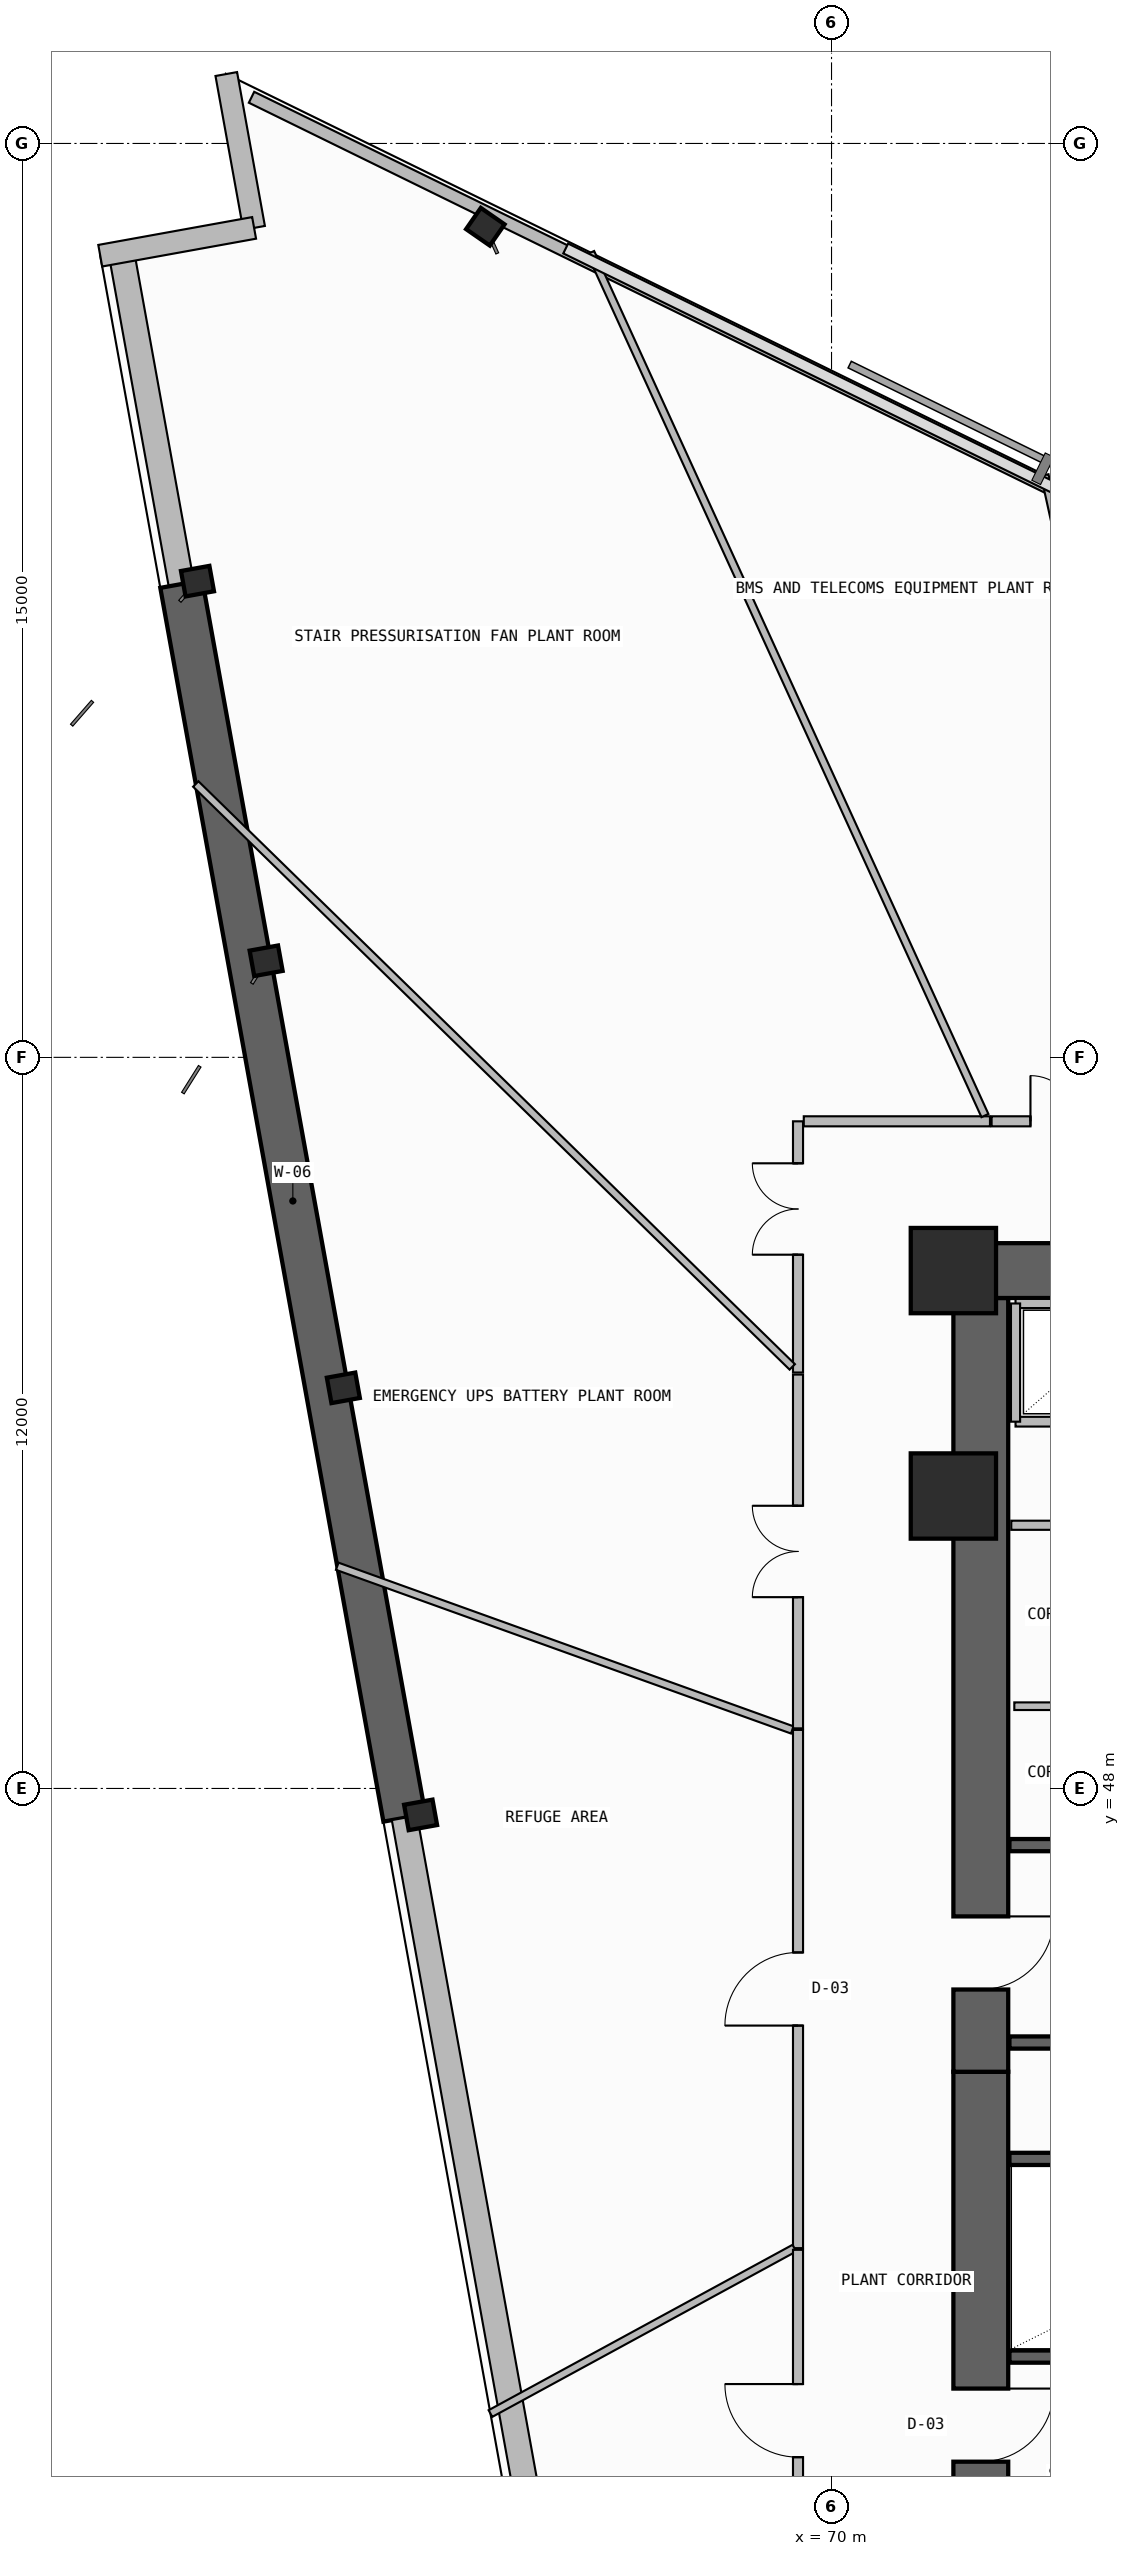
"""IFC4 building model, lengths in metres.
Left out: names, types, materials, properties, quantities, classifications, styles, units other than length and angle.
Written with IfcOpenShell. Run it as: python <this file> out.ifc"""

import sys

from ifc_helpers import new_model, si_unit, direction, frame, frame_2d, origin, origin_2d, place, context, subcontext, project, spatial, rectangle, i_section, extrude, element, fill, save


model = new_model("IFC4")
c1 = context("Model", 3, precision=1e-05, world=origin(), true_north=direction((0.0, 1.0)))
c2 = subcontext(c1, "Body", "Model", "MODEL_VIEW")
j1 = project(units=[si_unit("LENGTHUNIT", "METRE"), si_unit("PLANEANGLEUNIT", "RADIAN")], contexts=[c1])
p1 = place(None, origin())
s1 = spatial("IfcSite", under=j1, at=p1, CompositionType="ELEMENT")
p2 = place(p1, origin())
s2 = spatial("IfcBuilding", under=s1, at=p2, CompositionType="ELEMENT")
p3 = place(p2, frame((0.0, 0.0, 128.1)))
s3 = spatial("IfcBuildingStorey", under=s2, at=p3, CompositionType="ELEMENT", Elevation=128.1)
p4 = place(p3, frame((72.45, 35.5, -0.5), z_axis=(0.0, 0.0, 1.0), x_axis=(0.0, 1.0, 0.0)))
e1 = element("IfcWall", 1, at=p4, inside=s3, PredefinedType="SHEAR", context=c2, shape_type="SweptSolid", body=[
    extrude(rectangle(XDim=7.85, YDim=0.9, at=frame_2d((3.925, 0.0))), origin(), (0.0, 0.0, 1.0), 4.3),
])
p5 = place(p4, frame((1.45, 0.0, 0.5)))
e2 = element("IfcOpeningElement", 2, at=p5, cuts=e1, PredefinedType="OPENING", context=c2, shape_type="SweptSolid", body=[
    extrude(rectangle(XDim=1.2, YDim=2.2, at=frame_2d((0.6, 1.1))), frame((0.0, 0.46, 0.0), z_axis=(0.0, -1.0, 0.0), x_axis=(1.0, 0.0, 0.0)), (0.0, 0.0, 1.0), 0.92),
])
p6 = place(p3, frame((72.45, 43.35, -0.5), z_axis=(0.0, 0.0, 1.0), x_axis=(0.0, 1.0, 0.0)))
e3 = element("IfcWall", 3, at=p6, inside=s3, PredefinedType="SHEAR", context=c2, shape_type="SweptSolid", body=[
    extrude(rectangle(XDim=12.7, YDim=0.9, at=frame_2d((6.35, 0.0))), origin(), (0.0, 0.0, 1.0), 4.3),
])
p7 = place(p6, frame((1.35, 0.0, 0.5)))
e4 = element("IfcOpeningElement", 4, at=p7, cuts=e3, PredefinedType="OPENING", context=c2, shape_type="SweptSolid", body=[
    extrude(rectangle(XDim=1.2, YDim=2.2, at=frame_2d((0.6, 1.1))), frame((0.0, 0.46, 0.0), z_axis=(0.0, -1.0, 0.0), x_axis=(1.0, 0.0, 0.0)), (0.0, 0.0, 1.0), 0.92),
])
p8 = place(p3, frame((72.0, 56.5, -0.5), z_axis=(0.0, 0.0, 1.0), x_axis=(1.0, 0.0, 0.0)))
e5 = element("IfcWall", 5, at=p8, inside=s3, PredefinedType="SHEAR", context=c2, shape_type="SweptSolid", body=[
    extrude(rectangle(XDim=13.9, YDim=0.9, at=frame_2d((6.95, 0.0))), origin(), (0.0, 0.0, 1.0), 4.3),
])
for number, where, z_axis, x_axis in (
    (6, (72.0, 52.8, 0.0), (0.0, 0.0, 1.0), (1.0, 0.0, 0.0)),
    (7, (72.0, 56.5, 0.0), (0.0, 0.0, 1.0), (1.0, 0.0, 0.0)),
):
    element("IfcColumn", number, at=place(p3, frame(where, z_axis=z_axis, x_axis=x_axis)), inside=s3, PredefinedType="COLUMN", context=c2, shape_type="SweptSolid", body=[
        extrude(rectangle(XDim=1.4, YDim=1.4, at=origin_2d()), origin(), (0.0, 0.0, 1.0), 4.2),
    ])
for number, where, z_axis, x_axis in (
    (8, (64.318, 73.633, 0.0), (0.0, 0.0, 1.0), (0.57, 0.822, 0.0)),
    (9, (59.594, 67.816, 0.0), (0.0, 0.0, 1.0), (-0.178, 0.984, 0.0)),
    (10, (60.72, 61.585, 0.0), (0.0, 0.0, 1.0), (-0.178, 0.984, 0.0)),
    (11, (61.988, 54.575, 0.0), (0.0, 0.0, 1.0), (-0.178, 0.984, 0.0)),
    (12, (63.255, 47.566, 0.0), (0.0, 0.0, 1.0), (-0.178, 0.984, 0.0)),
):
    element("IfcColumn", number, at=place(p3, frame(where, z_axis=z_axis, x_axis=x_axis)), inside=s3, PredefinedType="COLUMN", context=c2, shape_type="SweptSolid", body=[
        extrude(i_section(OverallWidth=0.424, OverallDepth=0.474, WebThickness=0.048, FlangeThickness=0.077, FilletRadius=0.015, at=origin_2d()), origin(), (0.0, 0.0, 1.0), 4.2),
    ])
p9 = place(p3, frame((58.342, 73.22, 0.0), z_axis=(0.0, 0.0, 1.0), x_axis=(0.177981837245, -0.984033772597, 0.0)))
e13 = element("IfcWall", 13, at=p9, inside=s3, PredefinedType="SOLIDWALL", context=c2, shape_type="SweptSolid", body=[
    extrude(rectangle(XDim=5.54, YDim=0.42, at=frame_2d((2.77, 0.0))), origin(), (0.0, 0.0, 1.0), 2.777),
])
p10 = place(p3, frame((59.328, 67.768, -0.5), z_axis=(0.0, 0.0, 1.0), x_axis=(0.177933213615, -0.984042565895, 0.0)))
e14 = element("IfcWall", 14, at=p10, inside=s3, PredefinedType="SHEAR", context=c2, shape_type="SweptSolid", body=[
    extrude(rectangle(XDim=20.579, YDim=0.7, at=frame_2d((10.289, 0.0))), origin(), (0.0, 0.0, 1.0), 4.3),
])
p11 = place(p3, frame((62.99, 47.518, 0.0), z_axis=(0.0, 0.0, 1.0), x_axis=(0.177948058674, -0.984039881516, 0.0)))
e15 = element("IfcWall", 15, at=p11, inside=s3, PredefinedType="SOLIDWALL", context=c2, shape_type="SweptSolid", body=[
    extrude(rectangle(XDim=13.455, YDim=0.42, at=frame_2d((6.728, 0.0))), origin(), (0.0, 0.0, 1.0), 2.777),
])
p12 = place(p3, frame((60.066, 76.139, 0.0), z_axis=(0.0, 0.0, 1.0), x_axis=(0.177897493713, -0.984049024048, 0.0)))
e16 = element("IfcWall", 16, at=p12, inside=s3, PredefinedType="SOLIDWALL", context=c2, shape_type="SweptSolid", body=[
    extrude(rectangle(XDim=2.566, YDim=0.36, at=frame_2d((1.283, 0.0))), origin(), (0.0, 0.0, 1.0), 3.8),
])
p13 = place(p3, frame((60.523, 73.614, 0.0), z_axis=(0.0, 0.0, 1.0), x_axis=(-0.984046012923, -0.177914149102, 0.0)))
e17 = element("IfcWall", 17, at=p13, inside=s3, PredefinedType="SOLIDWALL", context=c2, shape_type="SweptSolid", body=[
    extrude(rectangle(XDim=2.566, YDim=0.36, at=frame_2d((1.283, 0.0))), origin(), (0.0, 0.0, 1.0), 3.8),
])
p14 = place(p3, frame((90.964, 60.822, 0.0), z_axis=(0.0, 0.0, 1.0), x_axis=(-0.897994223128, 0.440007244519, 0.0)))
e18 = element("IfcWall", 18, at=p14, inside=s3, PredefinedType="PARAPET", context=c2, shape_type="SweptSolid", body=[
    extrude(rectangle(XDim=33.947, YDim=0.2, at=frame_2d((16.973, 0.0))), origin(), (0.0, 0.0, 1.0), 1.15),
])
p15 = place(p3, frame((72.92, 38.675, -0.5), z_axis=(0.0, 0.0, 1.0), x_axis=(1.0, 0.0, 0.0)))
e19 = element("IfcWall", 19, at=p15, inside=s3, PredefinedType="SOLIDWALL", context=c2, shape_type="SweptSolid", body=[
    extrude(rectangle(XDim=7.7, YDim=0.2, at=frame_2d((3.85, 0.0))), origin(), (0.0, 0.0, 1.0), 4.3),
])
p16 = place(p3, frame((72.92, 41.92, -0.5), z_axis=(0.0, 0.0, 1.0), x_axis=(1.0, 0.0, 0.0)))
e20 = element("IfcWall", 20, at=p16, inside=s3, PredefinedType="SOLIDWALL", context=c2, shape_type="SweptSolid", body=[
    extrude(rectangle(XDim=7.58, YDim=0.2, at=frame_2d((3.79, 0.0))), origin(), (0.0, 0.0, 1.0), 4.3),
])
for number, where, z_axis, x_axis in (
    (21, (72.92, 43.83, -0.5), (0.0, 0.0, 1.0), (1.0, 0.0, 0.0)),
    (22, (72.92, 47.07, -0.5), (0.0, 0.0, 1.0), (1.0, 0.0, 0.0)),
):
    element("IfcWall", number, at=place(p3, frame(where, z_axis=z_axis, x_axis=x_axis)), inside=s3, PredefinedType="SOLIDWALL", context=c2, shape_type="SweptSolid", body=[
        extrude(rectangle(XDim=7.7, YDim=0.2, at=frame_2d((3.85, 0.0))), origin(), (0.0, 0.0, 1.0), 4.3),
    ])
p17 = place(p3, frame((72.95, 52.32, 0.0), z_axis=(0.0, 0.0, 1.0), x_axis=(1.0, 0.0, 0.0)))
e23 = element("IfcWall", 23, at=p17, inside=s3, PredefinedType="SOLIDWALL", context=c2, shape_type="SweptSolid", body=[
    extrude(rectangle(XDim=3.33, YDim=0.15, at=frame_2d((1.665, 0.0))), origin(), (0.0, 0.0, 1.0), 3.8),
])
p18 = place(p3, frame((73.0, 49.35, 0.0), z_axis=(0.0, 0.0, 1.0), x_axis=(1.0, 0.0, 0.0)))
e24 = element("IfcWall", 24, at=p18, inside=s3, PredefinedType="PARTITIONING", context=c2, shape_type="SweptSolid", body=[
    extrude(rectangle(XDim=3.28, YDim=0.125, at=frame_2d((1.64, 0.0))), origin(), (0.0, 0.0, 1.0), 3.8),
])
p19 = place(p3, frame((73.02, 54.02, 0.0), z_axis=(0.0, 0.0, 1.0), x_axis=(1.0, 0.0, 0.0)))
e25 = element("IfcWall", 25, at=p19, inside=s3, PredefinedType="SOLIDWALL", context=c2, shape_type="SweptSolid", body=[
    extrude(rectangle(XDim=12.08, YDim=0.16, at=frame_2d((6.04, 0.0))), origin(), (0.0, 0.0, 1.0), 3.8),
])
p20 = place(p3, frame((73.02, 55.96, 0.0), z_axis=(0.0, 0.0, 1.0), x_axis=(1.0, 0.0, 0.0)))
e26 = element("IfcWall", 26, at=p20, inside=s3, PredefinedType="SOLIDWALL", context=c2, shape_type="SweptSolid", body=[
    extrude(rectangle(XDim=3.5, YDim=0.15, at=frame_2d((1.75, 0.0))), origin(), (0.0, 0.0, 1.0), 3.8),
])
p21 = place(p3, frame((73.02, 54.02, 0.0), z_axis=(0.0, 0.0, 1.0), x_axis=(0.0, 1.0, 0.0)))
e27 = element("IfcWall", 27, at=p21, inside=s3, PredefinedType="PLUMBINGWALL", context=c2, shape_type="SweptSolid", body=[
    extrude(rectangle(XDim=1.94, YDim=0.15, at=frame_2d((0.97, 0.0))), origin(), (0.0, 0.0, 1.0), 3.8),
])
p22 = place(p3, frame((69.45, 48.961, 0.0), z_axis=(0.0, 0.0, 1.0), x_axis=(0.0, -1.0, 0.0)))
e28 = element("IfcWall", 28, at=p22, inside=s3, PredefinedType="PARTITIONING", context=c2, shape_type="SweptSolid", body=[
    extrude(rectangle(XDim=8.506, YDim=0.165, at=frame_2d((4.253, 0.0))), origin(), (0.0, 0.0, 1.0), 3.8),
])
p23 = place(p22, frame((3.653, 0.0, 0.0)))
e29 = element("IfcOpeningElement", 29, at=p23, cuts=e28, PredefinedType="OPENING", context=c2, shape_type="SweptSolid", body=[
    extrude(rectangle(XDim=1.2, YDim=2.2, at=frame_2d((0.6, 1.1))), frame((0.0, 0.093, 0.0), z_axis=(0.0, -1.0, 0.0), x_axis=(1.0, 0.0, 0.0)), (0.0, 0.0, 1.0), 0.185),
])
p24 = place(p3, frame((69.39, 40.455, 0.0), z_axis=(0.0, 0.0, 1.0), x_axis=(-0.87836010214, -0.477999509382, 0.0)))
e30 = element("IfcWall", 30, at=p24, inside=s3, PredefinedType="PARTITIONING", context=c2, shape_type="SweptSolid", body=[
    extrude(rectangle(XDim=5.679, YDim=0.125, at=frame_2d((2.84, 0.0))), origin(), (0.0, 0.0, 1.0), 3.8),
])
p25 = place(p3, frame((61.887, 51.647, 0.0), z_axis=(0.0, 0.0, 1.0), x_axis=(0.940969732106, -0.3384907137, 0.0)))
e31 = element("IfcWall", 31, at=p25, inside=s3, PredefinedType="PARTITIONING", context=c2, shape_type="SweptSolid", body=[
    extrude(rectangle(XDim=7.937, YDim=0.125, at=frame_2d((3.968, 0.0))), origin(), (0.0, 0.0, 1.0), 2.777),
])
p26 = place(p3, frame((69.45, 40.428, 0.0), z_axis=(0.0, 0.0, 1.0), x_axis=(0.0, -1.0, 0.0)))
e32 = element("IfcWall", 32, at=p26, inside=s3, PredefinedType="PARTITIONING", context=c2, shape_type="SweptSolid", body=[
    extrude(rectangle(XDim=5.607, YDim=0.165, at=frame_2d((2.803, 0.0))), origin(), (0.0, 0.0, 1.0), 3.8),
])
p27 = place(p26, frame((2.203, 0.0, 0.0)))
e33 = element("IfcOpeningElement", 33, at=p27, cuts=e32, PredefinedType="OPENING", context=c2, shape_type="SweptSolid", body=[
    extrude(rectangle(XDim=1.2, YDim=2.2, at=frame_2d((0.6, 1.1))), frame((0.0, 0.093, 0.0), z_axis=(0.0, -1.0, 0.0), x_axis=(1.0, 0.0, 0.0)), (0.0, 0.0, 1.0), 0.185),
])
p28 = place(p3, frame((75.817, 59.044, 0.0), z_axis=(0.0, 0.0, 1.0), x_axis=(-0.215290072493, 0.976550144481, 0.0)))
e34 = element("IfcWall", 34, at=p28, inside=s3, PredefinedType="PARTITIONING", context=c2, shape_type="SweptSolid", body=[
    extrude(rectangle(XDim=10.765, YDim=0.125, at=frame_2d((5.383, 0.0))), origin(), (0.0, 0.0, 1.0), 3.8),
])
p29 = place(p3, frame((69.45, 58.95, 0.0), z_axis=(0.0, 0.0, 1.0), x_axis=(0.0, -1.0, 0.0)))
e35 = element("IfcWall", 35, at=p29, inside=s3, PredefinedType="PARTITIONING", context=c2, shape_type="SweptSolid", body=[
    extrude(rectangle(XDim=4.123, YDim=0.165, at=frame_2d((2.062, 0.0))), origin(), (0.0, 0.0, 1.0), 2.777),
])
p30 = place(p29, frame((0.689, 0.0, 0.0)))
e36 = element("IfcOpeningElement", 36, at=p30, cuts=e35, PredefinedType="OPENING", context=c2, shape_type="SweptSolid", body=[
    extrude(rectangle(XDim=1.5, YDim=2.25, at=frame_2d((0.75, 1.125))), frame((0.0, 0.093, 0.0), z_axis=(0.0, -1.0, 0.0), x_axis=(1.0, 0.0, 0.0)), (0.0, 0.0, 1.0), 0.185),
])
p31 = place(p3, frame((72.601, 58.95, 0.0), z_axis=(0.0, 0.0, 1.0), x_axis=(-1.0, 0.0, 0.0)))
e37 = element("IfcWall", 37, at=p31, inside=s3, PredefinedType="PARTITIONING", context=c2, shape_type="SweptSolid", body=[
    extrude(rectangle(XDim=3.056, YDim=0.165, at=frame_2d((1.528, 0.0))), origin(), (0.0, 0.0, 1.0), 2.777),
])
p32 = place(p3, frame((66.047, 73.209, 0.0), z_axis=(0.0, 0.0, 1.0), x_axis=(0.415532629707, -0.909578272415, 0.0)))
e38 = element("IfcWall", 38, at=p32, inside=s3, PredefinedType="PARTITIONING", context=c2, shape_type="SweptSolid", body=[
    extrude(rectangle(XDim=15.573, YDim=0.125, at=frame_2d((7.786, 0.0))), origin(), (0.0, 0.0, 1.0), 3.8),
])
p33 = place(p3, frame((69.355, 54.919, 0.0), z_axis=(0.0, 0.0, 1.0), x_axis=(-0.715183960521, 0.698936265058, 0.0)))
e39 = element("IfcWall", 39, at=p33, inside=s3, PredefinedType="PARTITIONING", context=c2, shape_type="SweptSolid", body=[
    extrude(rectangle(XDim=13.689, YDim=0.125, at=frame_2d((6.844, 0.0))), origin(), (0.0, 0.0, 1.0), 2.777),
])
p34 = place(p3, frame((75.778, 58.95, 0.0), z_axis=(0.0, 0.0, 1.0), x_axis=(-1.0, 0.0, 0.0)))
e40 = element("IfcWall", 40, at=p34, inside=s3, PredefinedType="PARTITIONING", context=c2, shape_type="SweptSolid", body=[
    extrude(rectangle(XDim=3.151, YDim=0.165, at=frame_2d((1.575, 0.0))), origin(), (0.0, 0.0, 1.0), 3.8),
])
p35 = place(p34, frame((1.013, 0.0, 0.0)))
e41 = element("IfcOpeningElement", 41, at=p35, cuts=e40, PredefinedType="OPENING", context=c2, shape_type="SweptSolid", body=[
    extrude(rectangle(XDim=1.5, YDim=2.25, at=frame_2d((0.75, 1.125))), frame((0.0, 0.093, 0.0), z_axis=(0.0, -1.0, 0.0), x_axis=(1.0, 0.0, 0.0)), (0.0, 0.0, 1.0), 0.185),
])
p36 = place(p3, frame((69.45, 54.793, 0.0), z_axis=(0.0, 0.0, 1.0), x_axis=(0.0, -1.0, 0.0)))
e42 = element("IfcWall", 42, at=p36, inside=s3, PredefinedType="PARTITIONING", context=c2, shape_type="SweptSolid", body=[
    extrude(rectangle(XDim=5.807, YDim=0.165, at=frame_2d((2.903, 0.0))), origin(), (0.0, 0.0, 1.0), 2.777),
])
p37 = place(p36, frame((2.153, 0.0, 0.0)))
e43 = element("IfcOpeningElement", 43, at=p37, cuts=e42, PredefinedType="OPENING", context=c2, shape_type="SweptSolid", body=[
    extrude(rectangle(XDim=1.5, YDim=2.25, at=frame_2d((0.75, 1.125))), frame((0.0, 0.093, 0.0), z_axis=(0.0, -1.0, 0.0), x_axis=(1.0, 0.0, 0.0)), (0.0, 0.0, 1.0), 0.185),
])
p38 = place(p5, frame((1.2, 0.0, 0.0), z_axis=(0.0, 0.0, 1.0), x_axis=(-1.0, 0.0, 0.0)))
e44 = element("IfcDoor", 44, at=p38, inside=s3, OperationType="SINGLE_SWING_LEFT", PredefinedType="USERDEFINED", context=c2, shape_type="SweptSolid", body=[
    extrude(rectangle(XDim=1.2, YDim=2.2, at=frame_2d((0.6, 1.1))), frame((0.0, 0.025, 0.0), z_axis=(0.0, -1.0, 0.0), x_axis=(1.0, 0.0, 0.0)), (0.0, 0.0, 1.0), 0.05),
])
fill(e2, e44)
p39 = place(p7, frame((1.2, 0.0, 0.0), z_axis=(0.0, 0.0, 1.0), x_axis=(-1.0, 0.0, 0.0)))
e45 = element("IfcDoor", 45, at=p39, inside=s3, OperationType="SINGLE_SWING_LEFT", PredefinedType="USERDEFINED", context=c2, shape_type="SweptSolid", body=[
    extrude(rectangle(XDim=1.2, YDim=2.2, at=frame_2d((0.6, 1.1))), frame((0.0, 0.025, 0.0), z_axis=(0.0, -1.0, 0.0), x_axis=(1.0, 0.0, 0.0)), (0.0, 0.0, 1.0), 0.05),
])
fill(e4, e45)
p40 = place(p23, frame((1.2, 0.0, 0.0), z_axis=(0.0, 0.0, 1.0), x_axis=(-1.0, 0.0, 0.0)))
e46 = element("IfcDoor", 46, at=p40, inside=s3, OperationType="SINGLE_SWING_LEFT", PredefinedType="USERDEFINED", context=c2, shape_type="SweptSolid", body=[
    extrude(rectangle(XDim=1.2, YDim=2.2, at=frame_2d((0.6, 1.1))), frame((0.0, 0.025, 0.0), z_axis=(0.0, -1.0, 0.0), x_axis=(1.0, 0.0, 0.0)), (0.0, 0.0, 1.0), 0.05),
])
fill(e29, e46)
p41 = place(p27, frame((1.2, 0.0, 0.0), z_axis=(0.0, 0.0, 1.0), x_axis=(-1.0, 0.0, 0.0)))
e47 = element("IfcDoor", 47, at=p41, inside=s3, OperationType="SINGLE_SWING_RIGHT", PredefinedType="USERDEFINED", context=c2, shape_type="SweptSolid", body=[
    extrude(rectangle(XDim=1.2, YDim=2.2, at=frame_2d((0.6, 1.1))), frame((0.0, 0.025, 0.0), z_axis=(0.0, -1.0, 0.0), x_axis=(1.0, 0.0, 0.0)), (0.0, 0.0, 1.0), 0.05),
])
fill(e33, e47)
p42 = place(p30, frame((1.5, 0.0, 0.0), z_axis=(0.0, 0.0, 1.0), x_axis=(-1.0, 0.0, 0.0)))
e48 = element("IfcDoor", 48, at=p42, inside=s3, OperationType="DOUBLE_DOOR_SINGLE_SWING", PredefinedType="DOOR", context=c2, shape_type="SweptSolid", body=[
    extrude(rectangle(XDim=1.5, YDim=2.25, at=frame_2d((0.75, 1.125))), frame((0.0, 0.025, 0.0), z_axis=(0.0, -1.0, 0.0), x_axis=(1.0, 0.0, 0.0)), (0.0, 0.0, 1.0), 0.05),
])
fill(e36, e48)
p43 = place(p35, frame((1.5, 0.0, 0.0), z_axis=(0.0, 0.0, 1.0), x_axis=(-1.0, 0.0, 0.0)))
e49 = element("IfcDoor", 49, at=p43, inside=s3, OperationType="DOUBLE_DOOR_SINGLE_SWING", PredefinedType="DOOR", context=c2, shape_type="SweptSolid", body=[
    extrude(rectangle(XDim=1.5, YDim=2.25, at=frame_2d((0.75, 1.125))), frame((0.0, 0.025, 0.0), z_axis=(0.0, -1.0, 0.0), x_axis=(1.0, 0.0, 0.0)), (0.0, 0.0, 1.0), 0.05),
])
fill(e41, e49)
p44 = place(p37, frame((1.5, 0.0, 0.0), z_axis=(0.0, 0.0, 1.0), x_axis=(-1.0, 0.0, 0.0)))
e50 = element("IfcDoor", 50, at=p44, inside=s3, OperationType="DOUBLE_DOOR_SINGLE_SWING", PredefinedType="DOOR", context=c2, shape_type="SweptSolid", body=[
    extrude(rectangle(XDim=1.5, YDim=2.25, at=frame_2d((0.75, 1.125))), frame((0.0, 0.025, 0.0), z_axis=(0.0, -1.0, 0.0), x_axis=(1.0, 0.0, 0.0)), (0.0, 0.0, 1.0), 0.05),
])
fill(e43, e50)
save(model, sys.argv[1])
